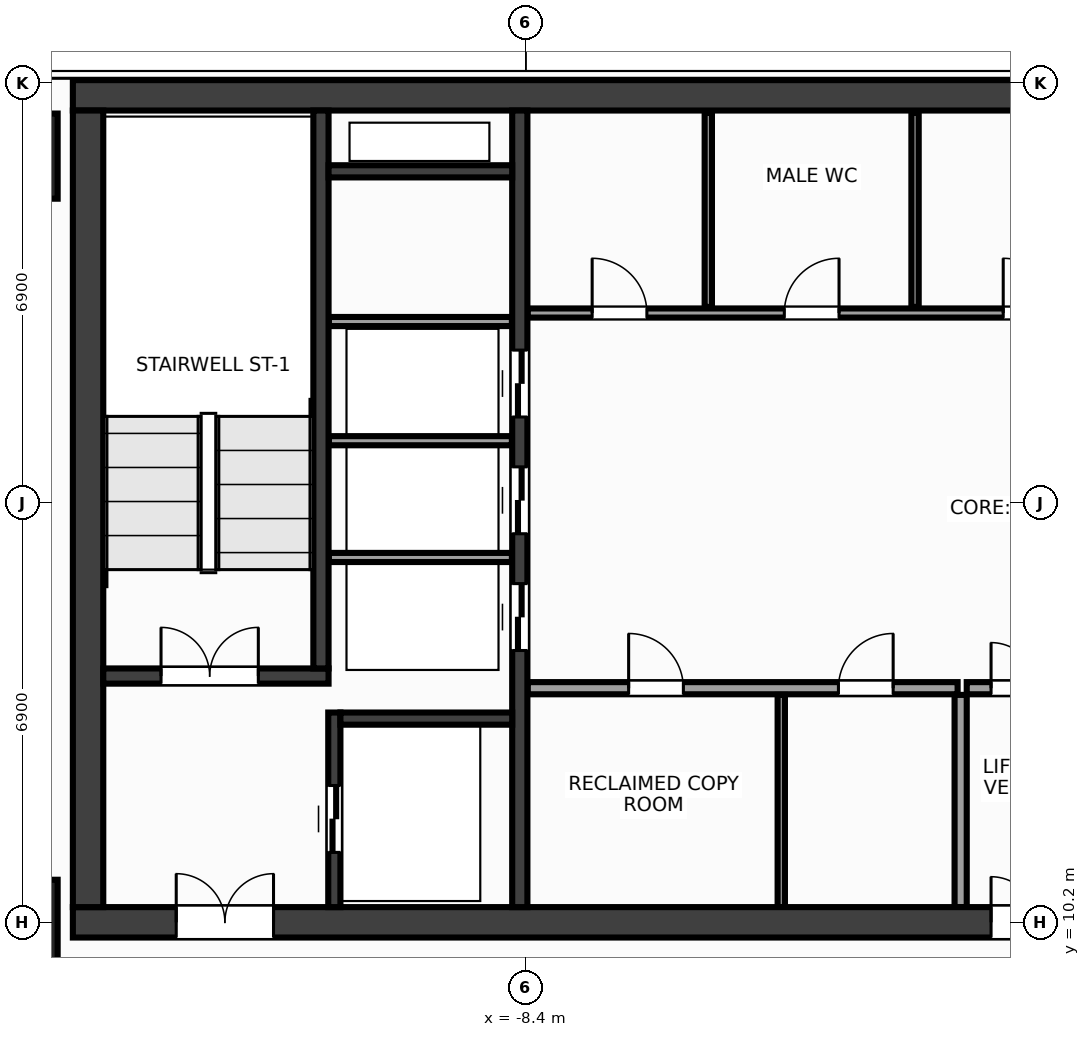
"""IFC4 building model, lengths in metres.
Left out: names, types, materials, properties, quantities, classifications, styles, units other than length and angle.
Written with IfcOpenShell. Run it as: python <this file> out.ifc"""

import sys

from ifc_helpers import new_model, si_unit, direction, frame, frame_2d, origin, origin_2d, place, context, subcontext, project, spatial, rectangle, extrude, source, transform, mapped, element, fill, save


model = new_model("IFC4")
c1 = context("Model", 3, precision=1e-05, world=origin(), true_north=direction((0.0, 1.0)))
c2 = subcontext(c1, "Body", "Model", "MODEL_VIEW")
j1 = project(units=[si_unit("LENGTHUNIT", "METRE"), si_unit("PLANEANGLEUNIT", "RADIAN")], contexts=[c1])
p1 = place(None, origin())
s1 = spatial("IfcSite", under=j1, at=p1, CompositionType="ELEMENT")
p2 = place(p1, origin())
s2 = spatial("IfcBuilding", under=s1, at=p2, CompositionType="ELEMENT")
p3 = place(p2, frame((0.0, 0.0, 239.6)))
s3 = spatial("IfcBuildingStorey", under=s2, at=p3, CompositionType="ELEMENT", Elevation=239.6)
m1 = source(origin(), c2, "Body", "SweptSolid", [
    extrude(rectangle(XDim=31.7, YDim=0.5, at=frame_2d((15.85, 0.0))), origin(), (0.0, 0.0, 1.0), 3.6),
])
p4 = place(p3, frame((-15.85, 23.8, 0.0), z_axis=(0.0, 0.0, 1.0), x_axis=(1.0, 0.0, 0.0)))
e1 = element("IfcWall", 1, at=p4, inside=s3, PredefinedType="SHEAR", context=c2, shape_type="MappedRepresentation", body=[
    mapped(m1, transform((0.0, 0.0, 0.0), x_axis=(1.0, 0.0, 0.0), y_axis=(0.0, 1.0, 0.0), z_axis=(0.0, 0.0, 1.0), scale=1.0)),
])
p5 = place(p3, frame((-15.85, 10.2, 0.0), z_axis=(0.0, 0.0, 1.0), x_axis=(1.0, 0.0, 0.0)))
e2 = element("IfcWall", 2, at=p5, inside=s3, PredefinedType="SHEAR", context=c2, shape_type="MappedRepresentation", body=[
    mapped(m1, transform((0.0, 0.0, 0.0), x_axis=(1.0, 0.0, 0.0), y_axis=(0.0, 1.0, 0.0), z_axis=(0.0, 0.0, 1.0), scale=1.0)),
])
p6 = place(p5, frame((1.7, 0.0, 0.0)))
e3 = element("IfcOpeningElement", 3, at=p6, cuts=e2, PredefinedType="OPENING", context=c2, shape_type="SweptSolid", body=[
    extrude(rectangle(XDim=1.6, YDim=2.15, at=frame_2d((0.8, 1.075))), frame((0.0, 0.262, 0.0), z_axis=(0.0, -1.0, 0.0), x_axis=(1.0, 0.0, 0.0)), (0.0, 0.0, 1.0), 0.524),
])
p7 = place(p5, frame((28.4, 0.0, 0.0)))
e4 = element("IfcOpeningElement", 4, at=p7, cuts=e2, PredefinedType="OPENING", context=c2, shape_type="SweptSolid", body=[
    extrude(rectangle(XDim=1.6, YDim=2.15, at=frame_2d((0.8, 1.075))), frame((0.0, 0.262, 0.0), z_axis=(0.0, -1.0, 0.0), x_axis=(1.0, 0.0, 0.0)), (0.0, 0.0, 1.0), 0.524),
])
p8 = place(p5, frame((15.1, 0.0, 0.0)))
e5 = element("IfcOpeningElement", 5, at=p8, cuts=e2, PredefinedType="OPENING", context=c2, shape_type="SweptSolid", body=[
    extrude(rectangle(XDim=1.5, YDim=2.2, at=frame_2d((0.75, 1.1))), frame((0.0, 0.262, 0.0), z_axis=(0.0, -1.0, 0.0), x_axis=(1.0, 0.0, 0.0)), (0.0, 0.0, 1.0), 0.524),
])
m2 = source(origin(), c2, "Body", "SweptSolid", [
    extrude(rectangle(XDim=13.1, YDim=0.5, at=frame_2d((6.55, 0.0))), origin(), (0.0, 0.0, 1.0), 3.6),
])
p9 = place(p3, frame((-15.6, 10.45, 0.0), z_axis=(0.0, 0.0, 1.0), x_axis=(0.0, 1.0, 0.0)))
e6 = element("IfcWall", 6, at=p9, inside=s3, PredefinedType="SHEAR", context=c2, shape_type="MappedRepresentation", body=[
    mapped(m2, transform((0.0, 0.0, 0.0), x_axis=(1.0, 0.0, 0.0), y_axis=(0.0, 1.0, 0.0), z_axis=(0.0, 0.0, 1.0), scale=1.0)),
])
m3 = source(origin(), c2, "Body", "SweptSolid", [
    extrude(rectangle(XDim=13.1, YDim=0.25, at=frame_2d((6.55, 0.0))), origin(), (0.0, 0.0, 1.0), 3.6),
])
p10 = place(p3, frame((-8.5, 10.45, 0.0), z_axis=(0.0, 0.0, 1.0), x_axis=(0.0, 1.0, 0.0)))
e7 = element("IfcWall", 7, at=p10, inside=s3, PredefinedType="SHEAR", context=c2, shape_type="MappedRepresentation", body=[
    mapped(m3, transform((0.0, 0.0, 0.0), x_axis=(1.0, 0.0, 0.0), y_axis=(0.0, 1.0, 0.0), z_axis=(0.0, 0.0, 1.0), scale=1.0)),
])
p11 = place(p10, frame((4.22, 0.0, 0.0)))
e8 = element("IfcOpeningElement", 8, at=p11, cuts=e7, PredefinedType="OPENING", context=c2, shape_type="SweptSolid", body=[
    extrude(rectangle(XDim=1.1, YDim=2.15, at=frame_2d((0.55, 1.075))), frame((0.0, 0.137, 0.0), z_axis=(0.0, -1.0, 0.0), x_axis=(1.0, 0.0, 0.0)), (0.0, 0.0, 1.0), 0.274),
])
p12 = place(p10, frame((6.14, 0.0, 0.0)))
e9 = element("IfcOpeningElement", 9, at=p12, cuts=e7, PredefinedType="OPENING", context=c2, shape_type="SweptSolid", body=[
    extrude(rectangle(XDim=1.1, YDim=2.15, at=frame_2d((0.55, 1.075))), frame((0.0, 0.137, 0.0), z_axis=(0.0, -1.0, 0.0), x_axis=(1.0, 0.0, 0.0)), (0.0, 0.0, 1.0), 0.274),
])
p13 = place(p10, frame((8.06, 0.0, 0.0)))
e10 = element("IfcOpeningElement", 10, at=p13, cuts=e7, PredefinedType="OPENING", context=c2, shape_type="SweptSolid", body=[
    extrude(rectangle(XDim=1.1, YDim=2.15, at=frame_2d((0.55, 1.075))), frame((0.0, 0.137, 0.0), z_axis=(0.0, -1.0, 0.0), x_axis=(1.0, 0.0, 0.0)), (0.0, 0.0, 1.0), 0.274),
])
m4 = source(origin(), c2, "Body", "SweptSolid", [
    extrude(rectangle(XDim=3.705, YDim=0.25, at=frame_2d((1.853, 0.0))), origin(), (0.0, 0.0, 1.0), 3.6),
])
p14 = place(p3, frame((-15.35, 14.25, 0.0), z_axis=(0.0, 0.0, 1.0), x_axis=(1.0, 0.0, 0.0)))
e11 = element("IfcWall", 11, at=p14, inside=s3, PredefinedType="SHEAR", context=c2, shape_type="MappedRepresentation", body=[
    mapped(m4, transform((0.0, 0.0, 0.0), x_axis=(1.0, 0.0, 0.0), y_axis=(0.0, 1.0, 0.0), z_axis=(0.0, 0.0, 1.0), scale=1.0)),
])
p15 = place(p14, frame((0.95, 0.0, 0.0)))
e12 = element("IfcOpeningElement", 12, at=p15, cuts=e11, PredefinedType="OPENING", context=c2, shape_type="SweptSolid", body=[
    extrude(rectangle(XDim=1.6, YDim=2.15, at=frame_2d((0.8, 1.075))), frame((0.0, 0.137, 0.0), z_axis=(0.0, -1.0, 0.0), x_axis=(1.0, 0.0, 0.0)), (0.0, 0.0, 1.0), 0.274),
])
m5 = source(origin(), c2, "Body", "SweptSolid", [
    extrude(rectangle(XDim=9.175, YDim=0.25, at=frame_2d((4.587, 0.0))), origin(), (0.0, 0.0, 1.0), 3.6),
])
p16 = place(p3, frame((-11.77, 14.375, 0.0), z_axis=(0.0, 0.0, 1.0), x_axis=(0.0, 1.0, 0.0)))
e13 = element("IfcWall", 13, at=p16, inside=s3, PredefinedType="SHEAR", context=c2, shape_type="MappedRepresentation", body=[
    mapped(m5, transform((0.0, 0.0, 0.0), x_axis=(1.0, 0.0, 0.0), y_axis=(0.0, 1.0, 0.0), z_axis=(0.0, 0.0, 1.0), scale=1.0)),
])
m6 = source(origin(), c2, "Body", "SweptSolid", [
    extrude(rectangle(XDim=3.2, YDim=0.2, at=frame_2d((1.6, 0.0))), origin(), (0.0, 0.0, 1.0), 3.6),
])
p17 = place(p3, frame((-11.55, 10.45, 0.0), z_axis=(0.0, 0.0, 1.0), x_axis=(0.0, 1.0, 0.0)))
e14 = element("IfcWall", 14, at=p17, inside=s3, PredefinedType="SHEAR", context=c2, shape_type="MappedRepresentation", body=[
    mapped(m6, transform((0.0, 0.0, 0.0), x_axis=(1.0, 0.0, 0.0), y_axis=(0.0, 1.0, 0.0), z_axis=(0.0, 0.0, 1.0), scale=1.0)),
])
p18 = place(p17, frame((0.9, 0.0, 0.0)))
e15 = element("IfcOpeningElement", 15, at=p18, cuts=e14, PredefinedType="OPENING", context=c2, shape_type="SweptSolid", body=[
    extrude(rectangle(XDim=1.1, YDim=2.15, at=frame_2d((0.55, 1.075))), frame((0.0, 0.112, 0.0), z_axis=(0.0, -1.0, 0.0), x_axis=(1.0, 0.0, 0.0)), (0.0, 0.0, 1.0), 0.224),
])
m7 = source(origin(), c2, "Body", "SweptSolid", [
    extrude(rectangle(XDim=2.825, YDim=0.2, at=frame_2d((1.413, 0.0))), origin(), (0.0, 0.0, 1.0), 3.6),
])
p19 = place(p3, frame((-11.45, 13.55, 0.0), z_axis=(0.0, 0.0, 1.0), x_axis=(1.0, 0.0, 0.0)))
e16 = element("IfcWall", 16, at=p19, inside=s3, PredefinedType="SHEAR", context=c2, shape_type="MappedRepresentation", body=[
    mapped(m7, transform((0.0, 0.0, 0.0), x_axis=(1.0, 0.0, 0.0), y_axis=(0.0, 1.0, 0.0), z_axis=(0.0, 0.0, 1.0), scale=1.0)),
])
m8 = source(origin(), c2, "Body", "SweptSolid", [
    extrude(rectangle(XDim=3.02, YDim=0.2, at=frame_2d((1.51, 0.0))), origin(), (0.0, 0.0, 1.0), 3.6),
])
p20 = place(p3, frame((-11.645, 22.55, 0.0), z_axis=(0.0, 0.0, 1.0), x_axis=(1.0, 0.0, 0.0)))
e17 = element("IfcWall", 17, at=p20, inside=s3, PredefinedType="SHEAR", context=c2, shape_type="MappedRepresentation", body=[
    mapped(m8, transform((0.0, 0.0, 0.0), x_axis=(1.0, 0.0, 0.0), y_axis=(0.0, 1.0, 0.0), z_axis=(0.0, 0.0, 1.0), scale=1.0)),
])
m9 = source(origin(), c2, "Body", "SweptSolid", [
    extrude(rectangle(XDim=1.4, YDim=1.4, at=origin_2d()), origin(), (0.0, 0.0, 1.0), 3.6),
])
for number, where, z_axis, x_axis in (
    (18, (-16.8, 10.2, 0.0), (0.0, 0.0, 1.0), (1.0, 0.0, 0.0)),
    (19, (-16.8, 22.8, 0.0), (0.0, 0.0, 1.0), (1.0, 0.0, 0.0)),
):
    element("IfcColumn", number, at=place(p3, frame(where, z_axis=z_axis, x_axis=x_axis)), inside=s3, PredefinedType="COLUMN", context=c2, shape_type="MappedRepresentation", body=[
        mapped(m9, transform((0.0, 0.0, 0.0), x_axis=(1.0, 0.0, 0.0), y_axis=(0.0, 1.0, 0.0), z_axis=(0.0, 0.0, 1.0), scale=1.0)),
    ])
m10 = source(origin(), c2, "Body", "SweptSolid", [
    extrude(rectangle(XDim=3.01, YDim=0.15, at=frame_2d((1.505, 0.0))), origin(), (0.0, 0.0, 1.0), 3.37),
])
for number, where, z_axis, x_axis in (
    (20, (-11.64, 16.2, 0.0), (0.0, 0.0, 1.0), (1.0, 0.0, 0.0)),
    (21, (-11.64, 18.12, 0.0), (0.0, 0.0, 1.0), (1.0, 0.0, 0.0)),
    (22, (-11.64, 20.08, 0.0), (0.0, 0.0, 1.0), (1.0, 0.0, 0.0)),
):
    element("IfcWall", number, at=place(p3, frame(where, z_axis=z_axis, x_axis=x_axis)), inside=s3, PredefinedType="PARTITIONING", context=c2, shape_type="MappedRepresentation", body=[
        mapped(m10, transform((0.0, 0.0, 0.0), x_axis=(1.0, 0.0, 0.0), y_axis=(0.0, 1.0, 0.0), z_axis=(0.0, 0.0, 1.0), scale=1.0)),
    ])
m11 = source(origin(), c2, "Body", "SweptSolid", [
    extrude(rectangle(XDim=7.07, YDim=0.2, at=frame_2d((3.535, 0.0))), origin(), (0.0, 0.0, 1.0), 3.37),
])
p21 = place(p3, frame((-8.37, 14.05, 0.0), z_axis=(0.0, 0.0, 1.0), x_axis=(1.0, 0.0, 0.0)))
e23 = element("IfcWall", 23, at=p21, inside=s3, PredefinedType="PARTITIONING", context=c2, shape_type="MappedRepresentation", body=[
    mapped(m11, transform((0.0, 0.0, 0.0), x_axis=(1.0, 0.0, 0.0), y_axis=(0.0, 1.0, 0.0), z_axis=(0.0, 0.0, 1.0), scale=1.0)),
])
p22 = place(p21, frame((1.66, 0.0, 0.0)))
e24 = element("IfcOpeningElement", 24, at=p22, cuts=e23, PredefinedType="OPENING", context=c2, shape_type="SweptSolid", body=[
    extrude(rectangle(XDim=0.9, YDim=2.15, at=frame_2d((0.45, 1.075))), frame((0.0, 0.112, 0.0), z_axis=(0.0, -1.0, 0.0), x_axis=(1.0, 0.0, 0.0)), (0.0, 0.0, 1.0), 0.224),
])
p23 = place(p21, frame((5.11, 0.0, 0.0)))
e25 = element("IfcOpeningElement", 25, at=p23, cuts=e23, PredefinedType="OPENING", context=c2, shape_type="SweptSolid", body=[
    extrude(rectangle(XDim=0.9, YDim=2.15, at=frame_2d((0.45, 1.075))), frame((0.0, 0.112, 0.0), z_axis=(0.0, -1.0, 0.0), x_axis=(1.0, 0.0, 0.0)), (0.0, 0.0, 1.0), 0.224),
])
m12 = source(origin(), c2, "Body", "SweptSolid", [
    extrude(rectangle(XDim=3.49, YDim=0.2, at=frame_2d((1.745, 0.0))), origin(), (0.0, 0.0, 1.0), 3.37),
])
p24 = place(p3, frame((-1.25, 10.45, 0.0), z_axis=(0.0, 0.0, 1.0), x_axis=(0.0, 1.0, 0.0)))
e26 = element("IfcWall", 26, at=p24, inside=s3, PredefinedType="PARTITIONING", context=c2, shape_type="MappedRepresentation", body=[
    mapped(m12, transform((0.0, 0.0, 0.0), x_axis=(1.0, 0.0, 0.0), y_axis=(0.0, 1.0, 0.0), z_axis=(0.0, 0.0, 1.0), scale=1.0)),
])
m13 = source(origin(), c2, "Body", "SweptSolid", [
    extrude(rectangle(XDim=2.3, YDim=0.2, at=frame_2d((1.15, 0.0))), origin(), (0.0, 0.0, 1.0), 3.37),
])
p25 = place(p3, frame((-1.15, 14.05, 0.0), z_axis=(0.0, 0.0, 1.0), x_axis=(1.0, 0.0, 0.0)))
e27 = element("IfcWall", 27, at=p25, inside=s3, PredefinedType="PARTITIONING", context=c2, shape_type="MappedRepresentation", body=[
    mapped(m13, transform((0.0, 0.0, 0.0), x_axis=(1.0, 0.0, 0.0), y_axis=(0.0, 1.0, 0.0), z_axis=(0.0, 0.0, 1.0), scale=1.0)),
])
p26 = place(p25, frame((0.4, 0.0, 0.0)))
e28 = element("IfcOpeningElement", 28, at=p26, cuts=e27, PredefinedType="OPENING", context=c2, shape_type="SweptSolid", body=[
    extrude(rectangle(XDim=1.5, YDim=2.2, at=frame_2d((0.75, 1.1))), frame((0.0, 0.112, 0.0), z_axis=(0.0, -1.0, 0.0), x_axis=(1.0, 0.0, 0.0)), (0.0, 0.0, 1.0), 0.224),
])
m14 = source(origin(), c2, "Body", "SweptSolid", [
    extrude(rectangle(XDim=14.59, YDim=0.15, at=frame_2d((7.295, 0.0))), origin(), (0.0, 0.0, 1.0), 3.37),
])
p27 = place(p3, frame((-8.37, 20.22, 0.0), z_axis=(0.0, 0.0, 1.0), x_axis=(1.0, 0.0, 0.0)))
e29 = element("IfcWall", 29, at=p27, inside=s3, PredefinedType="PARTITIONING", context=c2, shape_type="MappedRepresentation", body=[
    mapped(m14, transform((0.0, 0.0, 0.0), x_axis=(1.0, 0.0, 0.0), y_axis=(0.0, 1.0, 0.0), z_axis=(0.0, 0.0, 1.0), scale=1.0)),
])
p28 = place(p27, frame((1.06, 0.0, 0.0)))
e30 = element("IfcOpeningElement", 30, at=p28, cuts=e29, PredefinedType="OPENING", context=c2, shape_type="SweptSolid", body=[
    extrude(rectangle(XDim=0.9, YDim=2.15, at=frame_2d((0.45, 1.075))), frame((0.0, 0.087, 0.0), z_axis=(0.0, -1.0, 0.0), x_axis=(1.0, 0.0, 0.0)), (0.0, 0.0, 1.0), 0.174),
])
p29 = place(p27, frame((4.22, 0.0, 0.0)))
e31 = element("IfcOpeningElement", 31, at=p29, cuts=e29, PredefinedType="OPENING", context=c2, shape_type="SweptSolid", body=[
    extrude(rectangle(XDim=0.9, YDim=2.15, at=frame_2d((0.45, 1.075))), frame((0.0, 0.087, 0.0), z_axis=(0.0, -1.0, 0.0), x_axis=(1.0, 0.0, 0.0)), (0.0, 0.0, 1.0), 0.174),
])
p30 = place(p27, frame((7.82, 0.0, 0.0)))
e32 = element("IfcOpeningElement", 32, at=p30, cuts=e29, PredefinedType="OPENING", context=c2, shape_type="SweptSolid", body=[
    extrude(rectangle(XDim=0.9, YDim=2.15, at=frame_2d((0.45, 1.075))), frame((0.0, 0.087, 0.0), z_axis=(0.0, -1.0, 0.0), x_axis=(1.0, 0.0, 0.0)), (0.0, 0.0, 1.0), 0.174),
])
p31 = place(p27, frame((11.87, 0.0, 0.0)))
e33 = element("IfcOpeningElement", 33, at=p31, cuts=e29, PredefinedType="OPENING", context=c2, shape_type="SweptSolid", body=[
    extrude(rectangle(XDim=0.9, YDim=2.15, at=frame_2d((0.45, 1.075))), frame((0.0, 0.087, 0.0), z_axis=(0.0, -1.0, 0.0), x_axis=(1.0, 0.0, 0.0)), (0.0, 0.0, 1.0), 0.174),
])
m15 = source(origin(), c2, "Body", "SweptSolid", [
    extrude(rectangle(XDim=3.49, YDim=0.12, at=frame_2d((1.745, 0.0))), origin(), (0.0, 0.0, 1.0), 3.37),
])
p32 = place(p3, frame((-4.2, 10.45, 0.0), z_axis=(0.0, 0.0, 1.0), x_axis=(0.0, 1.0, 0.0)))
e34 = element("IfcWall", 34, at=p32, inside=s3, PredefinedType="PARTITIONING", context=c2, shape_type="MappedRepresentation", body=[
    mapped(m15, transform((0.0, 0.0, 0.0), x_axis=(1.0, 0.0, 0.0), y_axis=(0.0, 1.0, 0.0), z_axis=(0.0, 0.0, 1.0), scale=1.0)),
])
m16 = source(origin(), c2, "Body", "SweptSolid", [
    extrude(rectangle(XDim=3.19, YDim=0.12, at=frame_2d((1.595, 0.0))), origin(), (0.0, 0.0, 1.0), 3.37),
])
for number, where, z_axis, x_axis in (
    (35, (-5.4, 20.32, 0.0), (0.0, 0.0, 1.0), (0.0, 1.0, 0.0)),
    (36, (-2.0, 20.32, 0.0), (0.0, 0.0, 1.0), (0.0, 1.0, 0.0)),
):
    element("IfcWall", number, at=place(p3, frame(where, z_axis=z_axis, x_axis=x_axis)), inside=s3, PredefinedType="PARTITIONING", context=c2, shape_type="MappedRepresentation", body=[
        mapped(m16, transform((0.0, 0.0, 0.0), x_axis=(1.0, 0.0, 0.0), y_axis=(0.0, 1.0, 0.0), z_axis=(0.0, 0.0, 1.0), scale=1.0)),
    ])
m17 = source(origin(), c2, "Body", "SweptSolid", [
    extrude(rectangle(XDim=1.6, YDim=2.15, at=frame_2d((0.8, 1.075))), frame((0.0, 0.025, 0.0), z_axis=(0.0, -1.0, 0.0), x_axis=(1.0, 0.0, 0.0)), (0.0, 0.0, 1.0), 0.05),
])
p33 = place(p15, origin())
e37 = element("IfcDoor", 37, at=p33, inside=s3, OperationType="DOUBLE_DOOR_SINGLE_SWING", PredefinedType="DOOR", context=c2, shape_type="MappedRepresentation", body=[
    mapped(m17, transform((0.0, 0.0, 0.0), x_axis=(1.0, 0.0, 0.0), y_axis=(0.0, 1.0, 0.0), z_axis=(0.0, 0.0, 1.0), scale=1.0)),
])
fill(e12, e37)
p34 = place(p6, origin())
e38 = element("IfcDoor", 38, at=p34, inside=s3, OperationType="DOUBLE_DOOR_SINGLE_SWING", PredefinedType="DOOR", context=c2, shape_type="MappedRepresentation", body=[
    mapped(m17, transform((0.0, 0.0, 0.0), x_axis=(1.0, 0.0, 0.0), y_axis=(0.0, 1.0, 0.0), z_axis=(0.0, 0.0, 1.0), scale=1.0)),
])
fill(e3, e38)
m18 = source(origin(), c2, "Body", "SweptSolid", [
    extrude(rectangle(XDim=1.1, YDim=2.15, at=frame_2d((0.55, 1.075))), frame((0.0, 0.025, 0.0), z_axis=(0.0, -1.0, 0.0), x_axis=(1.0, 0.0, 0.0)), (0.0, 0.0, 1.0), 0.05),
])
p35 = place(p18, origin())
e39 = element("IfcDoor", 39, at=p35, inside=s3, OperationType="DOUBLE_DOOR_SLIDING", PredefinedType="DOOR", context=c2, shape_type="MappedRepresentation", body=[
    mapped(m18, transform((0.0, 0.0, 0.0), x_axis=(1.0, 0.0, 0.0), y_axis=(0.0, 1.0, 0.0), z_axis=(0.0, 0.0, 1.0), scale=1.0)),
])
fill(e15, e39)
p36 = place(p11, origin())
e40 = element("IfcDoor", 40, at=p36, inside=s3, OperationType="DOUBLE_DOOR_SLIDING", PredefinedType="DOOR", context=c2, shape_type="MappedRepresentation", body=[
    mapped(m18, transform((0.0, 0.0, 0.0), x_axis=(1.0, 0.0, 0.0), y_axis=(0.0, 1.0, 0.0), z_axis=(0.0, 0.0, 1.0), scale=1.0)),
])
fill(e8, e40)
p37 = place(p12, origin())
e41 = element("IfcDoor", 41, at=p37, inside=s3, OperationType="DOUBLE_DOOR_SLIDING", PredefinedType="DOOR", context=c2, shape_type="MappedRepresentation", body=[
    mapped(m18, transform((0.0, 0.0, 0.0), x_axis=(1.0, 0.0, 0.0), y_axis=(0.0, 1.0, 0.0), z_axis=(0.0, 0.0, 1.0), scale=1.0)),
])
fill(e9, e41)
p38 = place(p13, origin())
e42 = element("IfcDoor", 42, at=p38, inside=s3, OperationType="DOUBLE_DOOR_SLIDING", PredefinedType="DOOR", context=c2, shape_type="MappedRepresentation", body=[
    mapped(m18, transform((0.0, 0.0, 0.0), x_axis=(1.0, 0.0, 0.0), y_axis=(0.0, 1.0, 0.0), z_axis=(0.0, 0.0, 1.0), scale=1.0)),
])
fill(e10, e42)
m19 = source(origin(), c2, "Body", "SweptSolid", [
    extrude(rectangle(XDim=0.9, YDim=2.15, at=frame_2d((0.45, 1.075))), frame((0.0, 0.025, 0.0), z_axis=(0.0, -1.0, 0.0), x_axis=(1.0, 0.0, 0.0)), (0.0, 0.0, 1.0), 0.05),
])
p39 = place(p22, origin())
e43 = element("IfcDoor", 43, at=p39, inside=s3, OperationType="SINGLE_SWING_LEFT", PredefinedType="DOOR", context=c2, shape_type="MappedRepresentation", body=[
    mapped(m19, transform((0.0, 0.0, 0.0), x_axis=(1.0, 0.0, 0.0), y_axis=(0.0, 1.0, 0.0), z_axis=(0.0, 0.0, 1.0), scale=1.0)),
])
fill(e24, e43)
p40 = place(p23, origin())
e44 = element("IfcDoor", 44, at=p40, inside=s3, OperationType="SINGLE_SWING_RIGHT", PredefinedType="DOOR", context=c2, shape_type="MappedRepresentation", body=[
    mapped(m19, transform((0.0, 0.0, 0.0), x_axis=(1.0, 0.0, 0.0), y_axis=(0.0, 1.0, 0.0), z_axis=(0.0, 0.0, 1.0), scale=1.0)),
])
fill(e25, e44)
m20 = source(origin(), c2, "Body", "SweptSolid", [
    extrude(rectangle(XDim=1.5, YDim=2.2, at=frame_2d((0.75, 1.1))), frame((0.0, 0.025, 0.0), z_axis=(0.0, -1.0, 0.0), x_axis=(1.0, 0.0, 0.0)), (0.0, 0.0, 1.0), 0.05),
])
p41 = place(p26, origin())
e45 = element("IfcDoor", 45, at=p41, inside=s3, OperationType="DOUBLE_DOOR_SINGLE_SWING", PredefinedType="DOOR", context=c2, shape_type="MappedRepresentation", body=[
    mapped(m20, transform((0.0, 0.0, 0.0), x_axis=(1.0, 0.0, 0.0), y_axis=(0.0, 1.0, 0.0), z_axis=(0.0, 0.0, 1.0), scale=1.0)),
])
fill(e28, e45)
p42 = place(p8, origin())
e46 = element("IfcDoor", 46, at=p42, inside=s3, OperationType="DOUBLE_DOOR_SINGLE_SWING", PredefinedType="DOOR", context=c2, shape_type="MappedRepresentation", body=[
    mapped(m20, transform((0.0, 0.0, 0.0), x_axis=(1.0, 0.0, 0.0), y_axis=(0.0, 1.0, 0.0), z_axis=(0.0, 0.0, 1.0), scale=1.0)),
])
fill(e5, e46)
p43 = place(p28, origin())
e47 = element("IfcDoor", 47, at=p43, inside=s3, OperationType="SINGLE_SWING_LEFT", PredefinedType="DOOR", context=c2, shape_type="MappedRepresentation", body=[
    mapped(m19, transform((0.0, 0.0, 0.0), x_axis=(1.0, 0.0, 0.0), y_axis=(0.0, 1.0, 0.0), z_axis=(0.0, 0.0, 1.0), scale=1.0)),
])
fill(e30, e47)
p44 = place(p29, origin())
e48 = element("IfcDoor", 48, at=p44, inside=s3, OperationType="SINGLE_SWING_RIGHT", PredefinedType="DOOR", context=c2, shape_type="MappedRepresentation", body=[
    mapped(m19, transform((0.0, 0.0, 0.0), x_axis=(1.0, 0.0, 0.0), y_axis=(0.0, 1.0, 0.0), z_axis=(0.0, 0.0, 1.0), scale=1.0)),
])
fill(e31, e48)
p45 = place(p30, origin())
e49 = element("IfcDoor", 49, at=p45, inside=s3, OperationType="SINGLE_SWING_LEFT", PredefinedType="DOOR", context=c2, shape_type="MappedRepresentation", body=[
    mapped(m19, transform((0.0, 0.0, 0.0), x_axis=(1.0, 0.0, 0.0), y_axis=(0.0, 1.0, 0.0), z_axis=(0.0, 0.0, 1.0), scale=1.0)),
])
fill(e32, e49)
save(model, sys.argv[1])
